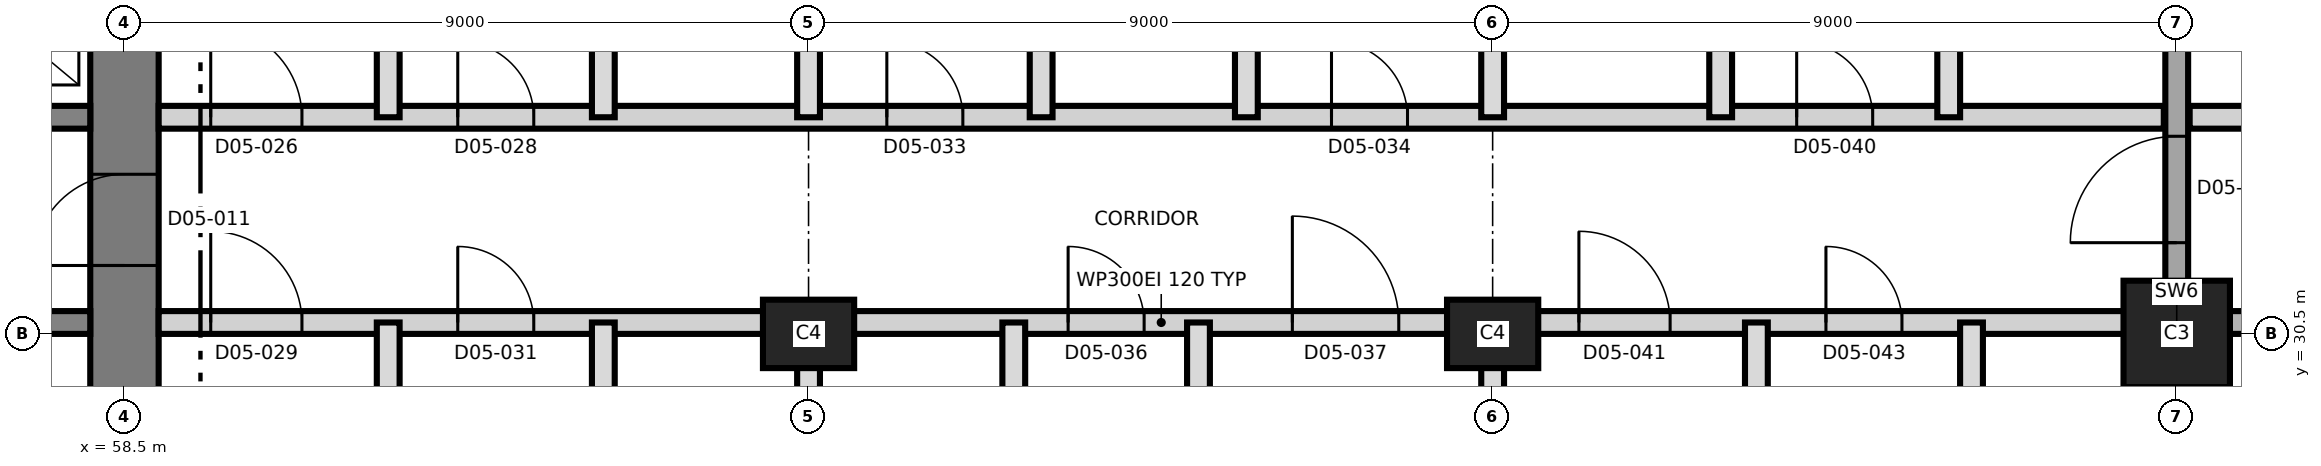
"""IFC4 building model, lengths in metres.
Left out: names, types, materials, properties, quantities, classifications, styles, units other than length and angle.
Written with IfcOpenShell. Run it as: python <this file> out.ifc"""

import sys

from ifc_helpers import new_model, si_unit, direction, frame, frame_2d, origin, origin_2d, place, context, subcontext, project, spatial, rectangle, extrude, element, fill, save


model = new_model("IFC4")
c1 = context("Model", 3, precision=1e-05, world=origin(), true_north=direction((0.0, 1.0)))
c2 = subcontext(c1, "Body", "Model", "MODEL_VIEW")
j1 = project(units=[si_unit("LENGTHUNIT", "METRE"), si_unit("PLANEANGLEUNIT", "RADIAN")], contexts=[c1])
p1 = place(None, origin())
s1 = spatial("IfcSite", under=j1, at=p1, CompositionType="ELEMENT")
p2 = place(p1, origin())
s2 = spatial("IfcBuilding", under=s1, at=p2, CompositionType="ELEMENT")
p3 = place(p2, frame((0.0, 0.0, 77.9)))
s3 = spatial("IfcBuildingStorey", under=s2, at=p3, CompositionType="ELEMENT", Elevation=77.9)
p4 = place(p3, frame((58.5, 21.05, 0.0), z_axis=(0.0, 0.0, 1.0), x_axis=(0.0, 1.0, 0.0)))
e1 = element("IfcWall", 1, at=p4, inside=s3, PredefinedType="SHEAR", context=c2, shape_type="SweptSolid", body=[
    extrude(rectangle(XDim=18.9, YDim=0.9, at=frame_2d((9.45, 0.0))), origin(), (0.0, 0.0, 1.0), 3.7),
])
p5 = place(p4, frame((10.35, 0.0, 0.0)))
e2 = element("IfcOpeningElement", 2, at=p5, cuts=e1, PredefinedType="OPENING", context=c2, shape_type="SweptSolid", body=[
    extrude(rectangle(XDim=1.2, YDim=2.1, at=frame_2d((0.6, 1.05))), frame((0.0, 0.46, 0.0), z_axis=(0.0, -1.0, 0.0), x_axis=(1.0, 0.0, 0.0)), (0.0, 0.0, 1.0), 0.92),
])
p6 = place(p3, frame((31.95, 30.65, 0.0), z_axis=(0.0, 0.0, 1.0), x_axis=(1.0, 0.0, 0.0)))
e3 = element("IfcWall", 3, at=p6, inside=s3, PredefinedType="SHEAR", context=c2, shape_type="SweptSolid", body=[
    extrude(rectangle(XDim=26.1, YDim=0.3, at=frame_2d((13.05, 0.0))), origin(), (0.0, 0.0, 1.0), 3.7),
])
p7 = place(p6, frame((24.55, 0.0, 0.0)))
e4 = element("IfcOpeningElement", 4, at=p7, cuts=e3, PredefinedType="OPENING", context=c2, shape_type="SweptSolid", body=[
    extrude(rectangle(XDim=1.0, YDim=2.1, at=frame_2d((0.5, 1.05))), frame((0.0, 0.16, 0.0), z_axis=(0.0, -1.0, 0.0), x_axis=(1.0, 0.0, 0.0)), (0.0, 0.0, 1.0), 0.32),
])
p8 = place(p6, frame((11.35, 0.0, 0.0)))
e5 = element("IfcOpeningElement", 5, at=p8, cuts=e3, PredefinedType="OPENING", context=c2, shape_type="SweptSolid", body=[
    extrude(rectangle(XDim=1.0, YDim=2.1, at=frame_2d((0.5, 1.05))), frame((0.0, 0.16, 0.0), z_axis=(0.0, -1.0, 0.0), x_axis=(1.0, 0.0, 0.0)), (0.0, 0.0, 1.0), 0.32),
])
p9 = place(p3, frame((31.95, 33.35, 0.0), z_axis=(0.0, 0.0, 1.0), x_axis=(1.0, 0.0, 0.0)))
e6 = element("IfcWall", 6, at=p9, inside=s3, PredefinedType="SHEAR", context=c2, shape_type="SweptSolid", body=[
    extrude(rectangle(XDim=26.1, YDim=0.3, at=frame_2d((13.05, 0.0))), origin(), (0.0, 0.0, 1.0), 3.7),
])
p10 = place(p9, frame((13.7, 0.0, 0.0)))
e7 = element("IfcOpeningElement", 7, at=p10, cuts=e6, PredefinedType="OPENING", context=c2, shape_type="SweptSolid", body=[
    extrude(rectangle(XDim=1.4, YDim=2.1, at=frame_2d((0.7, 1.05))), frame((0.0, 0.16, 0.0), z_axis=(0.0, -1.0, 0.0), x_axis=(1.0, 0.0, 0.0)), (0.0, 0.0, 1.0), 0.32),
])
p11 = place(p9, frame((5.175, 0.0, 0.0)))
e8 = element("IfcOpeningElement", 8, at=p11, cuts=e6, PredefinedType="OPENING", context=c2, shape_type="SweptSolid", body=[
    extrude(rectangle(XDim=1.2, YDim=2.1, at=frame_2d((0.6, 1.05))), frame((0.0, 0.16, 0.0), z_axis=(0.0, -1.0, 0.0), x_axis=(1.0, 0.0, 0.0)), (0.0, 0.0, 1.0), 0.32),
])
p12 = place(p9, frame((19.725, 0.0, 0.0)))
e9 = element("IfcOpeningElement", 9, at=p12, cuts=e6, PredefinedType="OPENING", context=c2, shape_type="SweptSolid", body=[
    extrude(rectangle(XDim=1.2, YDim=2.1, at=frame_2d((0.6, 1.05))), frame((0.0, 0.16, 0.0), z_axis=(0.0, -1.0, 0.0), x_axis=(1.0, 0.0, 0.0)), (0.0, 0.0, 1.0), 0.32),
])
for number, where, z_axis, x_axis in (
    (10, (67.5, 30.5, 0.0), (0.0, 0.0, 1.0), (1.0, 0.0, 0.0)),
    (11, (76.5, 30.5, 0.0), (0.0, 0.0, 1.0), (1.0, 0.0, 0.0)),
):
    element("IfcColumn", number, at=place(p3, frame(where, z_axis=z_axis, x_axis=x_axis)), inside=s3, PredefinedType="COLUMN", context=c2, shape_type="SweptSolid", body=[
        extrude(rectangle(XDim=1.2, YDim=0.9, at=origin_2d()), origin(), (0.0, 0.0, 1.0), 3.7),
    ])
p13 = place(p3, frame((85.5, 30.5, 0.0), z_axis=(0.0, 0.0, 1.0), x_axis=(1.0, 0.0, 0.0)))
e12 = element("IfcColumn", 12, at=p13, inside=s3, PredefinedType="COLUMN", context=c2, shape_type="SweptSolid", body=[
    extrude(rectangle(XDim=1.4, YDim=1.4, at=origin_2d()), origin(), (0.0, 0.0, 1.0), 3.7),
])
p14 = place(p3, frame((85.5, 20.35, 0.0), z_axis=(0.0, 0.0, 1.0), x_axis=(0.0, 1.0, 0.0)))
e13 = element("IfcWall", 13, at=p14, inside=s3, PredefinedType="SHEAR", context=c2, shape_type="SweptSolid", body=[
    extrude(rectangle(XDim=20.3, YDim=0.3, at=frame_2d((10.15, 0.0))), origin(), (0.0, 0.0, 1.0), 3.7),
])
p15 = place(p14, frame((11.35, 0.0, 0.0)))
e14 = element("IfcOpeningElement", 14, at=p15, cuts=e13, PredefinedType="OPENING", context=c2, shape_type="SweptSolid", body=[
    extrude(rectangle(XDim=1.4, YDim=2.1, at=frame_2d((0.7, 1.05))), frame((0.0, 0.16, 0.0), z_axis=(0.0, -1.0, 0.0), x_axis=(1.0, 0.0, 0.0)), (0.0, 0.0, 1.0), 0.32),
])
p16 = place(p3, frame((58.95, 30.65, 0.0), z_axis=(0.0, 0.0, 1.0), x_axis=(1.0, 0.0, 0.0)))
e15 = element("IfcWall", 15, at=p16, inside=s3, PredefinedType="PARTITIONING", context=c2, shape_type="SweptSolid", body=[
    extrude(rectangle(XDim=26.38, YDim=0.3, at=frame_2d((13.19, 0.0))), origin(), (0.0, 0.0, 1.0), 3.4),
])
p17 = place(p16, frame((0.685, 0.0, 0.0)))
e16 = element("IfcOpeningElement", 16, at=p17, cuts=e15, PredefinedType="OPENING", context=c2, shape_type="SweptSolid", body=[
    extrude(rectangle(XDim=1.2, YDim=2.1, at=frame_2d((0.6, 1.05))), frame((0.0, 0.16, 0.0), z_axis=(0.0, -1.0, 0.0), x_axis=(1.0, 0.0, 0.0)), (0.0, 0.0, 1.0), 0.32),
])
p18 = place(p16, frame((3.935, 0.0, 0.0)))
e17 = element("IfcOpeningElement", 17, at=p18, cuts=e15, PredefinedType="OPENING", context=c2, shape_type="SweptSolid", body=[
    extrude(rectangle(XDim=1.0, YDim=2.1, at=frame_2d((0.5, 1.05))), frame((0.0, 0.16, 0.0), z_axis=(0.0, -1.0, 0.0), x_axis=(1.0, 0.0, 0.0)), (0.0, 0.0, 1.0), 0.32),
])
p19 = place(p16, frame((11.965, 0.0, 0.0)))
e18 = element("IfcOpeningElement", 18, at=p19, cuts=e15, PredefinedType="OPENING", context=c2, shape_type="SweptSolid", body=[
    extrude(rectangle(XDim=1.0, YDim=2.1, at=frame_2d((0.5, 1.05))), frame((0.0, 0.16, 0.0), z_axis=(0.0, -1.0, 0.0), x_axis=(1.0, 0.0, 0.0)), (0.0, 0.0, 1.0), 0.32),
])
p20 = place(p16, frame((14.915, 0.0, 0.0)))
e19 = element("IfcOpeningElement", 19, at=p20, cuts=e15, PredefinedType="OPENING", context=c2, shape_type="SweptSolid", body=[
    extrude(rectangle(XDim=1.4, YDim=2.1, at=frame_2d((0.7, 1.05))), frame((0.0, 0.16, 0.0), z_axis=(0.0, -1.0, 0.0), x_axis=(1.0, 0.0, 0.0)), (0.0, 0.0, 1.0), 0.32),
])
p21 = place(p16, frame((18.685, 0.0, 0.0)))
e20 = element("IfcOpeningElement", 20, at=p21, cuts=e15, PredefinedType="OPENING", context=c2, shape_type="SweptSolid", body=[
    extrude(rectangle(XDim=1.2, YDim=2.1, at=frame_2d((0.6, 1.05))), frame((0.0, 0.16, 0.0), z_axis=(0.0, -1.0, 0.0), x_axis=(1.0, 0.0, 0.0)), (0.0, 0.0, 1.0), 0.32),
])
p22 = place(p16, frame((21.935, 0.0, 0.0)))
e21 = element("IfcOpeningElement", 21, at=p22, cuts=e15, PredefinedType="OPENING", context=c2, shape_type="SweptSolid", body=[
    extrude(rectangle(XDim=1.0, YDim=2.1, at=frame_2d((0.5, 1.05))), frame((0.0, 0.16, 0.0), z_axis=(0.0, -1.0, 0.0), x_axis=(1.0, 0.0, 0.0)), (0.0, 0.0, 1.0), 0.32),
])
p23 = place(p3, frame((85.67, 30.65, 0.0), z_axis=(0.0, 0.0, 1.0), x_axis=(1.0, 0.0, 0.0)))
e22 = element("IfcWall", 22, at=p23, inside=s3, PredefinedType="SHEAR", context=c2, shape_type="SweptSolid", body=[
    extrude(rectangle(XDim=9.58, YDim=0.3, at=frame_2d((4.79, 0.0))), origin(), (0.0, 0.0, 1.0), 3.4),
])
p24 = place(p23, frame((2.08, 0.0, 0.0)))
e23 = element("IfcOpeningElement", 23, at=p24, cuts=e22, PredefinedType="OPENING", context=c2, shape_type="SweptSolid", body=[
    extrude(rectangle(XDim=1.2, YDim=2.1, at=frame_2d((0.6, 1.05))), frame((0.0, 0.16, 0.0), z_axis=(0.0, -1.0, 0.0), x_axis=(1.0, 0.0, 0.0)), (0.0, 0.0, 1.0), 0.32),
])
p25 = place(p23, frame((5.63, 0.0, 0.0)))
e24 = element("IfcOpeningElement", 24, at=p25, cuts=e22, PredefinedType="OPENING", context=c2, shape_type="SweptSolid", body=[
    extrude(rectangle(XDim=1.0, YDim=2.1, at=frame_2d((0.5, 1.05))), frame((0.0, 0.16, 0.0), z_axis=(0.0, -1.0, 0.0), x_axis=(1.0, 0.0, 0.0)), (0.0, 0.0, 1.0), 0.32),
])
p26 = place(p3, frame((58.95, 33.35, 0.0), z_axis=(0.0, 0.0, 1.0), x_axis=(1.0, 0.0, 0.0)))
e25 = element("IfcWall", 25, at=p26, inside=s3, PredefinedType="PARTITIONING", context=c2, shape_type="SweptSolid", body=[
    extrude(rectangle(XDim=26.38, YDim=0.3, at=frame_2d((13.19, 0.0))), origin(), (0.0, 0.0, 1.0), 3.4),
])
p27 = place(p26, frame((0.685, 0.0, 0.0)))
e26 = element("IfcOpeningElement", 26, at=p27, cuts=e25, PredefinedType="OPENING", context=c2, shape_type="SweptSolid", body=[
    extrude(rectangle(XDim=1.2, YDim=2.1, at=frame_2d((0.6, 1.05))), frame((0.0, 0.16, 0.0), z_axis=(0.0, -1.0, 0.0), x_axis=(1.0, 0.0, 0.0)), (0.0, 0.0, 1.0), 0.32),
])
p28 = place(p26, frame((3.935, 0.0, 0.0)))
e27 = element("IfcOpeningElement", 27, at=p28, cuts=e25, PredefinedType="OPENING", context=c2, shape_type="SweptSolid", body=[
    extrude(rectangle(XDim=1.0, YDim=2.1, at=frame_2d((0.5, 1.05))), frame((0.0, 0.16, 0.0), z_axis=(0.0, -1.0, 0.0), x_axis=(1.0, 0.0, 0.0)), (0.0, 0.0, 1.0), 0.32),
])
p29 = place(p26, frame((9.58, 0.0, 0.0)))
e28 = element("IfcOpeningElement", 28, at=p29, cuts=e25, PredefinedType="OPENING", context=c2, shape_type="SweptSolid", body=[
    extrude(rectangle(XDim=1.0, YDim=2.1, at=frame_2d((0.5, 1.05))), frame((0.0, 0.16, 0.0), z_axis=(0.0, -1.0, 0.0), x_axis=(1.0, 0.0, 0.0)), (0.0, 0.0, 1.0), 0.32),
])
p30 = place(p26, frame((15.43, 0.0, 0.0)))
e29 = element("IfcOpeningElement", 29, at=p30, cuts=e25, PredefinedType="OPENING", context=c2, shape_type="SweptSolid", body=[
    extrude(rectangle(XDim=1.0, YDim=2.1, at=frame_2d((0.5, 1.05))), frame((0.0, 0.16, 0.0), z_axis=(0.0, -1.0, 0.0), x_axis=(1.0, 0.0, 0.0)), (0.0, 0.0, 1.0), 0.32),
])
p31 = place(p26, frame((21.55, 0.0, 0.0)))
e30 = element("IfcOpeningElement", 30, at=p31, cuts=e25, PredefinedType="OPENING", context=c2, shape_type="SweptSolid", body=[
    extrude(rectangle(XDim=1.0, YDim=2.4, at=frame_2d((0.5, 1.2))), frame((0.0, 0.16, 0.0), z_axis=(0.0, -1.0, 0.0), x_axis=(1.0, 0.0, 0.0)), (0.0, 0.0, 1.0), 0.32),
])
p32 = place(p3, frame((85.67, 33.35, 0.0), z_axis=(0.0, 0.0, 1.0), x_axis=(1.0, 0.0, 0.0)))
e31 = element("IfcWall", 31, at=p32, inside=s3, PredefinedType="PARTITIONING", context=c2, shape_type="SweptSolid", body=[
    extrude(rectangle(XDim=9.58, YDim=0.3, at=frame_2d((4.79, 0.0))), origin(), (0.0, 0.0, 1.0), 3.4),
])
p33 = place(p32, frame((1.83, 0.0, 0.0)))
e32 = element("IfcOpeningElement", 32, at=p33, cuts=e31, PredefinedType="OPENING", context=c2, shape_type="SweptSolid", body=[
    extrude(rectangle(XDim=1.0, YDim=2.1, at=frame_2d((0.5, 1.05))), frame((0.0, 0.16, 0.0), z_axis=(0.0, -1.0, 0.0), x_axis=(1.0, 0.0, 0.0)), (0.0, 0.0, 1.0), 0.32),
])
p34 = place(p32, frame((5.63, 0.0, 0.0)))
e33 = element("IfcOpeningElement", 33, at=p34, cuts=e31, PredefinedType="OPENING", context=c2, shape_type="SweptSolid", body=[
    extrude(rectangle(XDim=1.0, YDim=2.1, at=frame_2d((0.5, 1.05))), frame((0.0, 0.16, 0.0), z_axis=(0.0, -1.0, 0.0), x_axis=(1.0, 0.0, 0.0)), (0.0, 0.0, 1.0), 0.32),
])
p35 = place(p3, frame((61.97, 20.35, 0.0), z_axis=(0.0, 0.0, 1.0), x_axis=(0.0, 1.0, 0.0)))
e34 = element("IfcWall", 34, at=p35, inside=s3, PredefinedType="PARTITIONING", context=c2, shape_type="SweptSolid", body=[
    extrude(rectangle(XDim=10.3, YDim=0.3, at=frame_2d((5.15, 0.0))), origin(), (0.0, 0.0, 1.0), 3.4),
])
p36 = place(p3, frame((61.97, 33.35, 0.0), z_axis=(0.0, 0.0, 1.0), x_axis=(0.0, 1.0, 0.0)))
e35 = element("IfcWall", 35, at=p36, inside=s3, PredefinedType="PARTITIONING", context=c2, shape_type="SweptSolid", body=[
    extrude(rectangle(XDim=7.48, YDim=0.3, at=frame_2d((3.74, 0.0))), origin(), (0.0, 0.0, 1.0), 3.4),
])
for number, where, z_axis, x_axis in (
    (36, (64.8, 27.45, 0.0), (0.0, 0.0, 1.0), (0.0, 1.0, 0.0)),
    (37, (64.8, 33.35, 0.0), (0.0, 0.0, 1.0), (0.0, 1.0, 0.0)),
):
    element("IfcWall", number, at=place(p3, frame(where, z_axis=z_axis, x_axis=x_axis)), inside=s3, PredefinedType="PARTITIONING", context=c2, shape_type="SweptSolid", body=[
        extrude(rectangle(XDim=3.2, YDim=0.3, at=frame_2d((1.6, 0.0))), origin(), (0.0, 0.0, 1.0), 3.4),
    ])
p37 = place(p3, frame((67.5, 20.35, 0.0), z_axis=(0.0, 0.0, 1.0), x_axis=(0.0, 1.0, 0.0)))
e38 = element("IfcWall", 38, at=p37, inside=s3, PredefinedType="PARTITIONING", context=c2, shape_type="SweptSolid", body=[
    extrude(rectangle(XDim=10.3, YDim=0.3, at=frame_2d((5.15, 0.0))), origin(), (0.0, 0.0, 1.0), 3.4),
])
p38 = place(p3, frame((67.5, 33.35, 0.0), z_axis=(0.0, 0.0, 1.0), x_axis=(0.0, 1.0, 0.0)))
e39 = element("IfcWall", 39, at=p38, inside=s3, PredefinedType="PARTITIONING", context=c2, shape_type="SweptSolid", body=[
    extrude(rectangle(XDim=7.48, YDim=0.3, at=frame_2d((3.74, 0.0))), origin(), (0.0, 0.0, 1.0), 3.4),
])
for number, where, z_axis, x_axis in (
    (40, (70.2, 27.45, 0.0), (0.0, 0.0, 1.0), (0.0, 1.0, 0.0)),
    (41, (70.56, 33.35, 0.0), (0.0, 0.0, 1.0), (0.0, 1.0, 0.0)),
):
    element("IfcWall", number, at=place(p3, frame(where, z_axis=z_axis, x_axis=x_axis)), inside=s3, PredefinedType="PARTITIONING", context=c2, shape_type="SweptSolid", body=[
        extrude(rectangle(XDim=3.2, YDim=0.3, at=frame_2d((1.6, 0.0))), origin(), (0.0, 0.0, 1.0), 3.4),
    ])
p39 = place(p3, frame((72.63, 20.35, 0.0), z_axis=(0.0, 0.0, 1.0), x_axis=(0.0, 1.0, 0.0)))
e42 = element("IfcWall", 42, at=p39, inside=s3, PredefinedType="PARTITIONING", context=c2, shape_type="SweptSolid", body=[
    extrude(rectangle(XDim=10.3, YDim=0.3, at=frame_2d((5.15, 0.0))), origin(), (0.0, 0.0, 1.0), 3.4),
])
p40 = place(p3, frame((73.26, 33.35, 0.0), z_axis=(0.0, 0.0, 1.0), x_axis=(0.0, 1.0, 0.0)))
e43 = element("IfcWall", 43, at=p40, inside=s3, PredefinedType="PARTITIONING", context=c2, shape_type="SweptSolid", body=[
    extrude(rectangle(XDim=7.48, YDim=0.3, at=frame_2d((3.74, 0.0))), origin(), (0.0, 0.0, 1.0), 3.4),
])
p41 = place(p3, frame((76.5, 20.35, 0.0), z_axis=(0.0, 0.0, 1.0), x_axis=(0.0, 1.0, 0.0)))
e44 = element("IfcWall", 44, at=p41, inside=s3, PredefinedType="PARTITIONING", context=c2, shape_type="SweptSolid", body=[
    extrude(rectangle(XDim=10.3, YDim=0.3, at=frame_2d((5.15, 0.0))), origin(), (0.0, 0.0, 1.0), 3.4),
])
p42 = place(p3, frame((76.5, 33.35, 0.0), z_axis=(0.0, 0.0, 1.0), x_axis=(0.0, 1.0, 0.0)))
e45 = element("IfcWall", 45, at=p42, inside=s3, PredefinedType="PARTITIONING", context=c2, shape_type="SweptSolid", body=[
    extrude(rectangle(XDim=7.48, YDim=0.3, at=frame_2d((3.74, 0.0))), origin(), (0.0, 0.0, 1.0), 3.4),
])
p43 = place(p3, frame((79.5, 33.35, 0.0), z_axis=(0.0, 0.0, 1.0), x_axis=(0.0, 1.0, 0.0)))
e46 = element("IfcWall", 46, at=p43, inside=s3, PredefinedType="PARTITIONING", context=c2, shape_type="SweptSolid", body=[
    extrude(rectangle(XDim=3.3, YDim=0.3, at=frame_2d((1.65, 0.0))), origin(), (0.0, 0.0, 1.0), 3.4),
])
p44 = place(p3, frame((79.97, 20.35, 0.0), z_axis=(0.0, 0.0, 1.0), x_axis=(0.0, 1.0, 0.0)))
e47 = element("IfcWall", 47, at=p44, inside=s3, PredefinedType="PARTITIONING", context=c2, shape_type="SweptSolid", body=[
    extrude(rectangle(XDim=10.3, YDim=0.3, at=frame_2d((5.15, 0.0))), origin(), (0.0, 0.0, 1.0), 3.4),
])
p45 = place(p3, frame((82.5, 33.35, 0.0), z_axis=(0.0, 0.0, 1.0), x_axis=(0.0, 1.0, 0.0)))
e48 = element("IfcWall", 48, at=p45, inside=s3, PredefinedType="PARTITIONING", context=c2, shape_type="SweptSolid", body=[
    extrude(rectangle(XDim=3.3, YDim=0.3, at=frame_2d((1.65, 0.0))), origin(), (0.0, 0.0, 1.0), 3.4),
])
p46 = place(p3, frame((82.8, 27.45, 0.0), z_axis=(0.0, 0.0, 1.0), x_axis=(0.0, 1.0, 0.0)))
e49 = element("IfcWall", 49, at=p46, inside=s3, PredefinedType="PARTITIONING", context=c2, shape_type="SweptSolid", body=[
    extrude(rectangle(XDim=3.2, YDim=0.3, at=frame_2d((1.6, 0.0))), origin(), (0.0, 0.0, 1.0), 3.4),
])
p47 = place(p5, origin())
e50 = element("IfcDoor", 50, at=p47, inside=s3, OperationType="SINGLE_SWING_LEFT", PredefinedType="DOOR", context=c2, shape_type="SweptSolid", body=[
    extrude(rectangle(XDim=1.2, YDim=2.1, at=frame_2d((0.6, 1.05))), frame((0.0, 0.025, 0.0), z_axis=(0.0, -1.0, 0.0), x_axis=(1.0, 0.0, 0.0)), (0.0, 0.0, 1.0), 0.05),
])
fill(e2, e50)
p48 = place(p27, origin())
e51 = element("IfcDoor", 51, at=p48, inside=s3, OperationType="SINGLE_SWING_LEFT", PredefinedType="DOOR", context=c2, shape_type="SweptSolid", body=[
    extrude(rectangle(XDim=1.2, YDim=2.1, at=frame_2d((0.6, 1.05))), frame((0.0, 0.025, 0.0), z_axis=(0.0, -1.0, 0.0), x_axis=(1.0, 0.0, 0.0)), (0.0, 0.0, 1.0), 0.05),
])
fill(e26, e51)
p49 = place(p28, origin())
e52 = element("IfcDoor", 52, at=p49, inside=s3, OperationType="SINGLE_SWING_LEFT", PredefinedType="DOOR", context=c2, shape_type="SweptSolid", body=[
    extrude(rectangle(XDim=1.0, YDim=2.1, at=frame_2d((0.5, 1.05))), frame((0.0, 0.025, 0.0), z_axis=(0.0, -1.0, 0.0), x_axis=(1.0, 0.0, 0.0)), (0.0, 0.0, 1.0), 0.05),
])
fill(e27, e52)
p50 = place(p17, origin())
e53 = element("IfcDoor", 53, at=p50, inside=s3, OperationType="SINGLE_SWING_LEFT", PredefinedType="DOOR", context=c2, shape_type="SweptSolid", body=[
    extrude(rectangle(XDim=1.2, YDim=2.1, at=frame_2d((0.6, 1.05))), frame((0.0, 0.025, 0.0), z_axis=(0.0, -1.0, 0.0), x_axis=(1.0, 0.0, 0.0)), (0.0, 0.0, 1.0), 0.05),
])
fill(e16, e53)
p51 = place(p18, origin())
e54 = element("IfcDoor", 54, at=p51, inside=s3, OperationType="SINGLE_SWING_LEFT", PredefinedType="DOOR", context=c2, shape_type="SweptSolid", body=[
    extrude(rectangle(XDim=1.0, YDim=2.1, at=frame_2d((0.5, 1.05))), frame((0.0, 0.025, 0.0), z_axis=(0.0, -1.0, 0.0), x_axis=(1.0, 0.0, 0.0)), (0.0, 0.0, 1.0), 0.05),
])
fill(e17, e54)
p52 = place(p29, origin())
e55 = element("IfcDoor", 55, at=p52, inside=s3, OperationType="SINGLE_SWING_LEFT", PredefinedType="DOOR", context=c2, shape_type="SweptSolid", body=[
    extrude(rectangle(XDim=1.0, YDim=2.1, at=frame_2d((0.5, 1.05))), frame((0.0, 0.025, 0.0), z_axis=(0.0, -1.0, 0.0), x_axis=(1.0, 0.0, 0.0)), (0.0, 0.0, 1.0), 0.05),
])
fill(e28, e55)
p53 = place(p30, origin())
e56 = element("IfcDoor", 56, at=p53, inside=s3, OperationType="SINGLE_SWING_RIGHT", PredefinedType="DOOR", context=c2, shape_type="SweptSolid", body=[
    extrude(rectangle(XDim=1.0, YDim=2.1, at=frame_2d((0.5, 1.05))), frame((0.0, 0.025, 0.0), z_axis=(0.0, -1.0, 0.0), x_axis=(1.0, 0.0, 0.0)), (0.0, 0.0, 1.0), 0.05),
])
fill(e29, e56)
p54 = place(p19, origin())
e57 = element("IfcDoor", 57, at=p54, inside=s3, OperationType="SINGLE_SWING_LEFT", PredefinedType="DOOR", context=c2, shape_type="SweptSolid", body=[
    extrude(rectangle(XDim=1.0, YDim=2.1, at=frame_2d((0.5, 1.05))), frame((0.0, 0.025, 0.0), z_axis=(0.0, -1.0, 0.0), x_axis=(1.0, 0.0, 0.0)), (0.0, 0.0, 1.0), 0.05),
])
fill(e18, e57)
p55 = place(p20, origin())
e58 = element("IfcDoor", 58, at=p55, inside=s3, OperationType="SINGLE_SWING_RIGHT", PredefinedType="DOOR", context=c2, shape_type="SweptSolid", body=[
    extrude(rectangle(XDim=1.4, YDim=2.1, at=frame_2d((0.7, 1.05))), frame((0.0, 0.025, 0.0), z_axis=(0.0, -1.0, 0.0), x_axis=(1.0, 0.0, 0.0)), (0.0, 0.0, 1.0), 0.05),
])
fill(e19, e58)
p56 = place(p31, origin())
e59 = element("IfcDoor", 59, at=p56, inside=s3, OperationType="SINGLE_SWING_LEFT", PredefinedType="DOOR", context=c2, shape_type="SweptSolid", body=[
    extrude(rectangle(XDim=1.0, YDim=2.4, at=frame_2d((0.5, 1.2))), frame((0.0, 0.025, 0.0), z_axis=(0.0, -1.0, 0.0), x_axis=(1.0, 0.0, 0.0)), (0.0, 0.0, 1.0), 0.05),
])
fill(e30, e59)
p57 = place(p21, origin())
e60 = element("IfcDoor", 60, at=p57, inside=s3, OperationType="SINGLE_SWING_LEFT", PredefinedType="DOOR", context=c2, shape_type="SweptSolid", body=[
    extrude(rectangle(XDim=1.2, YDim=2.1, at=frame_2d((0.6, 1.05))), frame((0.0, 0.025, 0.0), z_axis=(0.0, -1.0, 0.0), x_axis=(1.0, 0.0, 0.0)), (0.0, 0.0, 1.0), 0.05),
])
fill(e20, e60)
p58 = place(p22, origin())
e61 = element("IfcDoor", 61, at=p58, inside=s3, OperationType="SINGLE_SWING_LEFT", PredefinedType="DOOR", context=c2, shape_type="SweptSolid", body=[
    extrude(rectangle(XDim=1.0, YDim=2.1, at=frame_2d((0.5, 1.05))), frame((0.0, 0.025, 0.0), z_axis=(0.0, -1.0, 0.0), x_axis=(1.0, 0.0, 0.0)), (0.0, 0.0, 1.0), 0.05),
])
fill(e21, e61)
p59 = place(p15, origin())
e62 = element("IfcDoor", 62, at=p59, inside=s3, OperationType="SINGLE_SWING_RIGHT", PredefinedType="DOOR", context=c2, shape_type="SweptSolid", body=[
    extrude(rectangle(XDim=1.4, YDim=2.1, at=frame_2d((0.7, 1.05))), frame((0.0, 0.025, 0.0), z_axis=(0.0, -1.0, 0.0), x_axis=(1.0, 0.0, 0.0)), (0.0, 0.0, 1.0), 0.05),
])
fill(e14, e62)
save(model, sys.argv[1])
